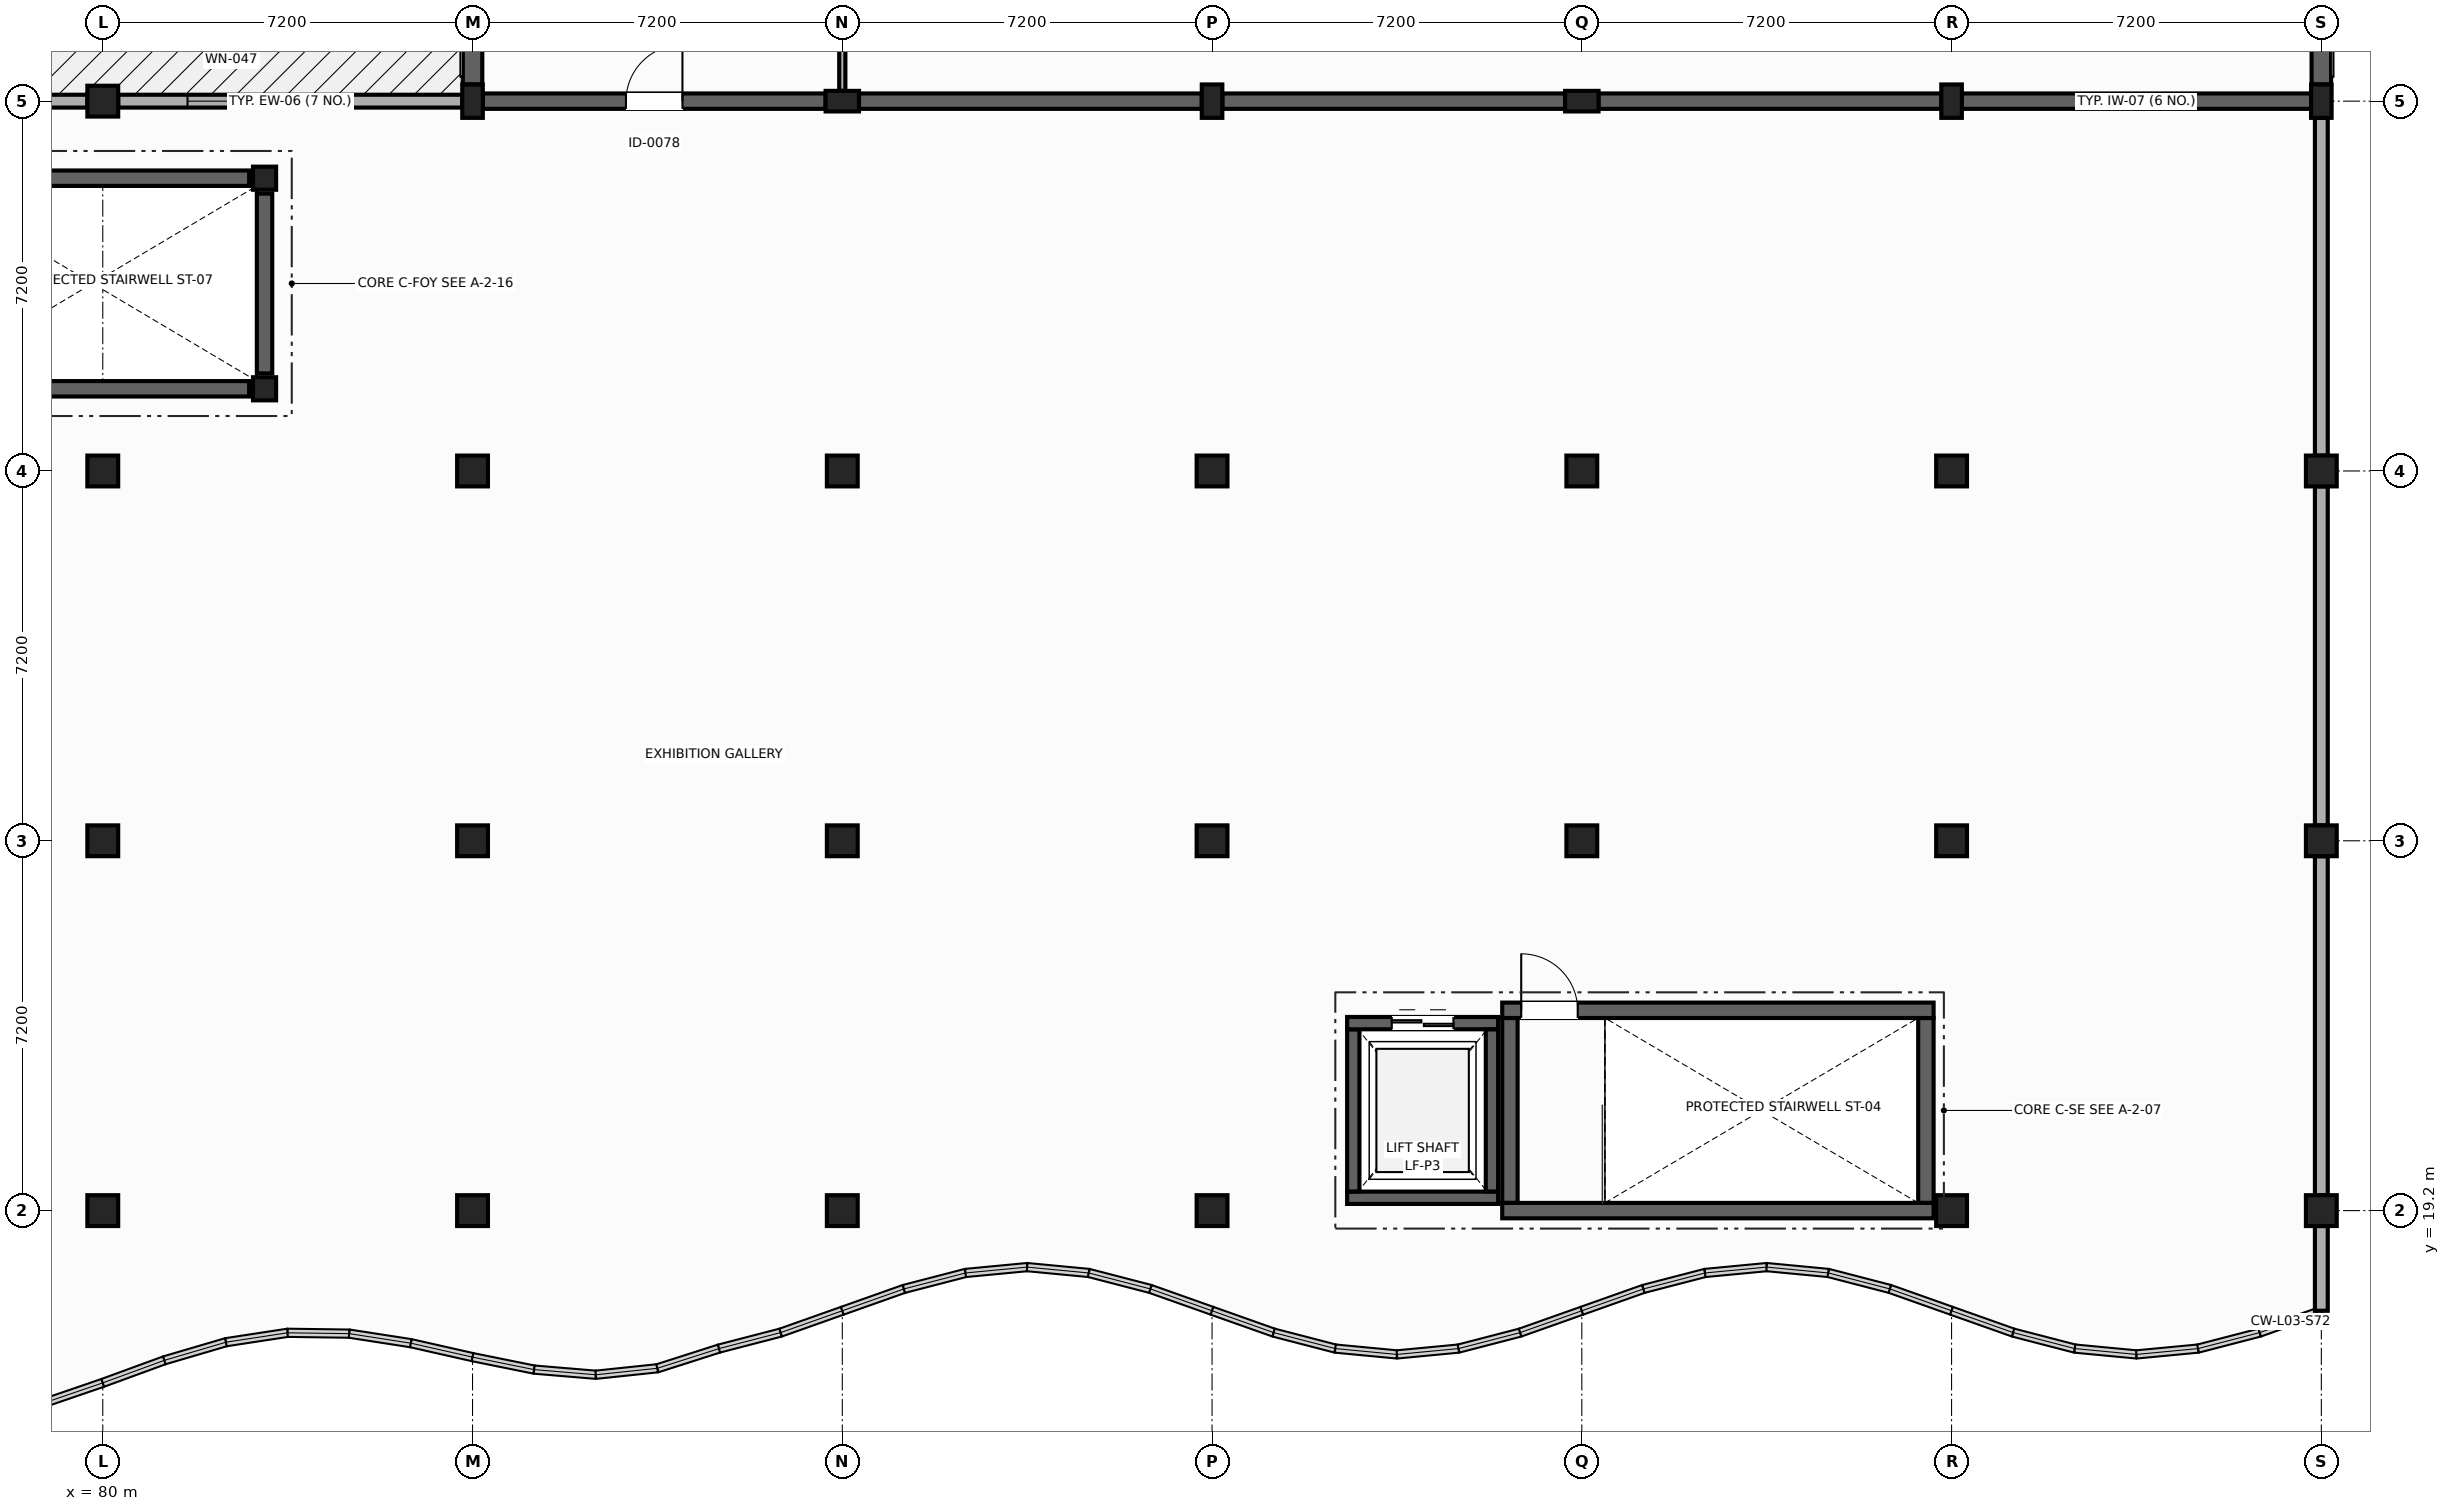
"""IFC4 building model, lengths in metres.
Left out: names, types, materials, properties, quantities, classifications, styles, units other than length and angle.
Written with IfcOpenShell. Run it as: python <this file> out.ifc"""

import sys

from ifc_helpers import new_model, si_unit, direction, frame, frame_2d, origin, origin_2d, place, context, subcontext, project, spatial, rectangle, extrude, element, fill, save


model = new_model("IFC4")
c1 = context("Model", 3, precision=1e-05, world=origin(), true_north=direction((0.0, 1.0)))
c2 = subcontext(c1, "Body", "Model", "MODEL_VIEW")
j1 = project(units=[si_unit("LENGTHUNIT", "METRE"), si_unit("PLANEANGLEUNIT", "RADIAN")], contexts=[c1])
p1 = place(None, origin())
s1 = spatial("IfcSite", under=j1, at=p1, CompositionType="ELEMENT")
p2 = place(p1, origin())
s2 = spatial("IfcBuilding", under=s1, at=p2, CompositionType="ELEMENT")
p3 = place(p2, frame((0.0, 0.0, 14.4)))
s3 = spatial("IfcBuildingStorey", under=s2, at=p3, CompositionType="ELEMENT", Elevation=14.4)
for number, where, z_axis, x_axis in (
    (1, (80.0, 19.2, 0.0), (0.0, 0.0, 1.0), (0.0, 1.0, 0.0)),
    (2, (87.2, 19.2, 0.0), (0.0, 0.0, 1.0), (1.0, 0.0, 0.0)),
    (3, (94.4, 19.2, 0.0), (0.0, 0.0, 1.0), (0.0, 1.0, 0.0)),
    (4, (101.6, 19.2, 0.0), (0.0, 0.0, 1.0), (1.0, 0.0, 0.0)),
    (5, (116.0, 19.2, 0.0), (0.0, 0.0, 1.0), (0.0, 1.0, 0.0)),
    (6, (123.2, 19.2, 0.0), (0.0, 0.0, 1.0), (1.0, 0.0, 0.0)),
    (7, (80.0, 26.4, 0.0), (0.0, 0.0, 1.0), (1.0, 0.0, 0.0)),
    (8, (87.2, 26.4, 0.0), (0.0, 0.0, 1.0), (0.0, 1.0, 0.0)),
    (9, (94.4, 26.4, 0.0), (0.0, 0.0, 1.0), (1.0, 0.0, 0.0)),
    (10, (101.6, 26.4, 0.0), (0.0, 0.0, 1.0), (1.0, 0.0, 0.0)),
    (11, (108.8, 26.4, 0.0), (0.0, 0.0, 1.0), (0.0, 1.0, 0.0)),
    (12, (116.0, 26.4, 0.0), (0.0, 0.0, 1.0), (1.0, 0.0, 0.0)),
    (13, (123.2, 26.4, 0.0), (0.0, 0.0, 1.0), (0.0, 1.0, 0.0)),
    (14, (80.0, 33.6, 0.0), (0.0, 0.0, 1.0), (0.0, 1.0, 0.0)),
    (15, (87.2, 33.6, 0.0), (0.0, 0.0, 1.0), (1.0, 0.0, 0.0)),
    (16, (94.4, 33.6, 0.0), (0.0, 0.0, 1.0), (1.0, 0.0, 0.0)),
    (17, (101.6, 33.6, 0.0), (0.0, 0.0, 1.0), (0.0, 1.0, 0.0)),
    (18, (108.8, 33.6, 0.0), (0.0, 0.0, 1.0), (1.0, 0.0, 0.0)),
    (19, (116.0, 33.6, 0.0), (0.0, 0.0, 1.0), (0.0, 1.0, 0.0)),
    (20, (123.2, 33.6, 0.0), (0.0, 0.0, 1.0), (1.0, 0.0, 0.0)),
    (21, (80.0, 40.8, 0.0), (0.0, 0.0, 1.0), (1.0, 0.0, 0.0)),
):
    element("IfcColumn", number, at=place(p3, frame(where, z_axis=z_axis, x_axis=x_axis)), inside=s3, PredefinedType="COLUMN", context=c2, shape_type="SweptSolid", body=[
        extrude(rectangle(XDim=0.6, YDim=0.6, at=origin_2d()), origin(), (0.0, 0.0, 1.0), 4.28),
    ])
p4 = place(p3, frame((87.2, 40.8, 0.0), z_axis=(0.0, 0.0, 1.0), x_axis=(1.0, 0.0, 0.0)))
e22 = element("IfcColumn", 22, at=p4, inside=s3, PredefinedType="PILASTER", context=c2, shape_type="SweptSolid", body=[
    extrude(rectangle(XDim=0.4, YDim=0.65, at=origin_2d()), origin(), (0.0, 0.0, 1.0), 4.5),
])
for number, where, z_axis, x_axis in (
    (23, (94.4, 40.8, 0.0), (0.0, 0.0, 1.0), (0.0, 1.0, 0.0)),
    (24, (101.6, 40.8, 0.0), (0.0, 0.0, 1.0), (1.0, 0.0, 0.0)),
    (25, (108.8, 40.8, 0.0), (0.0, 0.0, 1.0), (0.0, 1.0, 0.0)),
    (26, (116.0, 40.8, 0.0), (0.0, 0.0, 1.0), (1.0, 0.0, 0.0)),
):
    element("IfcColumn", number, at=place(p3, frame(where, z_axis=z_axis, x_axis=x_axis)), inside=s3, PredefinedType="PILASTER", context=c2, shape_type="SweptSolid", body=[
        extrude(rectangle(XDim=0.4, YDim=0.65, at=origin_2d()), origin(), (0.0, 0.0, 1.0), 4.28),
    ])
p5 = place(p3, frame((123.2, 40.8, 0.0), z_axis=(0.0, 0.0, 1.0), x_axis=(1.0, 0.0, 0.0)))
e27 = element("IfcColumn", 27, at=p5, inside=s3, PredefinedType="PILASTER", context=c2, shape_type="SweptSolid", body=[
    extrude(rectangle(XDim=0.4, YDim=0.65, at=origin_2d()), origin(), (0.0, 0.0, 1.0), 4.5),
])
for number, where, z_axis, x_axis in (
    (28, (83.15, 35.2, 0.0), (0.0, 0.0, 1.0), (1.0, 0.0, 0.0)),
    (29, (83.15, 39.3, 0.0), (0.0, 0.0, 1.0), (1.0, 0.0, 0.0)),
):
    element("IfcColumn", number, at=place(p3, frame(where, z_axis=z_axis, x_axis=x_axis)), inside=s3, PredefinedType="COLUMN", context=c2, shape_type="SweptSolid", body=[
        extrude(rectangle(XDim=0.45, YDim=0.45, at=origin_2d()), origin(), (0.0, 0.0, 1.0), 4.28),
    ])
p6 = place(p3, frame((123.2, 40.475, 0.0), z_axis=(0.0, 0.0, 1.0), x_axis=(0.0, -1.0, 0.0)))
e30 = element("IfcWall", 30, at=p6, inside=s3, PredefinedType="SOLIDWALL", context=c2, shape_type="SweptSolid", body=[
    extrude(rectangle(XDim=6.575, YDim=0.25, at=frame_2d((3.288, 0.0))), origin(), (0.0, 0.0, 1.0), 3.575),
])
for number, where, z_axis, x_axis in (
    (31, (123.2, 33.3, 0.0), (0.0, 0.0, 1.0), (0.0, -1.0, 0.0)),
    (32, (123.2, 26.1, 0.0), (0.0, 0.0, 1.0), (0.0, -1.0, 0.0)),
):
    element("IfcWall", number, at=place(p3, frame(where, z_axis=z_axis, x_axis=x_axis)), inside=s3, PredefinedType="SOLIDWALL", context=c2, shape_type="SweptSolid", body=[
        extrude(rectangle(XDim=6.6, YDim=0.25, at=frame_2d((3.3, 0.0))), origin(), (0.0, 0.0, 1.0), 3.575),
    ])
p7 = place(p3, frame((73.1, 40.8, 0.0), z_axis=(0.0, 0.0, 1.0), x_axis=(1.0, 0.0, 0.0)))
e33 = element("IfcWall", 33, at=p7, inside=s3, PredefinedType="SOLIDWALL", context=c2, shape_type="SweptSolid", body=[
    extrude(rectangle(XDim=6.6, YDim=0.25, at=frame_2d((3.3, 0.0))), origin(), (0.0, 0.0, 1.0), 3.775),
])
p8 = place(p7, frame((2.65, 0.0, 0.9)))
e34 = element("IfcOpeningElement", 34, at=p8, cuts=e33, PredefinedType="OPENING", context=c2, shape_type="SweptSolid", body=[
    extrude(rectangle(XDim=1.3, YDim=1.6, at=frame_2d((0.65, 0.8))), frame((0.0, 0.135, 0.0), z_axis=(0.0, -1.0, 0.0), x_axis=(1.0, 0.0, 0.0)), (0.0, 0.0, 1.0), 0.27),
])
p9 = place(p3, frame((80.3, 40.8, 0.0), z_axis=(0.0, 0.0, 1.0), x_axis=(1.0, 0.0, 0.0)))
e35 = element("IfcWall", 35, at=p9, inside=s3, PredefinedType="SOLIDWALL", context=c2, shape_type="SweptSolid", body=[
    extrude(rectangle(XDim=6.7, YDim=0.25, at=frame_2d((3.35, 0.0))), origin(), (0.0, 0.0, 1.0), 3.775),
])
p10 = place(p9, frame((1.35, 0.0, 0.9)))
e36 = element("IfcOpeningElement", 36, at=p10, cuts=e35, PredefinedType="OPENING", context=c2, shape_type="SweptSolid", body=[
    extrude(rectangle(XDim=1.7, YDim=1.6, at=frame_2d((0.85, 0.8))), frame((0.0, 0.135, 0.0), z_axis=(0.0, -1.0, 0.0), x_axis=(1.0, 0.0, 0.0)), (0.0, 0.0, 1.0), 0.27),
])
for number, where, z_axis, x_axis in (
    (37, (87.2, 41.125, 0.0), (0.0, 0.0, 1.0), (0.0, 1.0, 0.0)),
    (38, (123.2, 47.8, 0.0), (0.0, 0.0, 1.0), (0.0, -1.0, 0.0)),
):
    element("IfcWall", number, at=place(p3, frame(where, z_axis=z_axis, x_axis=x_axis)), inside=s3, PredefinedType="SHEAR", context=c2, shape_type="SweptSolid", body=[
        extrude(rectangle(XDim=6.675, YDim=0.38, at=frame_2d((3.337, 0.0))), origin(), (0.0, 0.0, 1.0), 4.5),
    ])
p11 = place(p3, frame((123.2, 17.25, 0.0), z_axis=(0.0, 0.0, 1.0), x_axis=(0.0, 1.0, 0.0)))
e39 = element("IfcWall", 39, at=p11, inside=s3, PredefinedType="SOLIDWALL", context=c2, shape_type="SweptSolid", body=[
    extrude(rectangle(XDim=1.65, YDim=0.25, at=frame_2d((0.825, 0.0))), origin(), (0.0, 0.0, 1.0), 3.435),
])
p12 = place(p3, frame((115.65, 19.2, 0.0), z_axis=(0.0, 0.0, 1.0), x_axis=(-1.0, 0.0, 0.0)))
e40 = element("IfcWall", 40, at=p12, inside=s3, PredefinedType="SHEAR", context=c2, shape_type="SweptSolid", body=[
    extrude(rectangle(XDim=8.4, YDim=0.3, at=frame_2d((4.2, 0.0))), origin(), (0.0, 0.0, 1.0), 4.28),
])
p13 = place(p3, frame((107.4, 19.352, 0.0), z_axis=(0.0, 0.0, 1.0), x_axis=(0.0, 1.0, 0.0)))
e41 = element("IfcWall", 41, at=p13, inside=s3, PredefinedType="SHEAR", context=c2, shape_type="SweptSolid", body=[
    extrude(rectangle(XDim=3.598, YDim=0.3, at=frame_2d((1.799, 0.0))), origin(), (0.0, 0.0, 1.0), 4.28),
])
p14 = place(p3, frame((107.25, 23.1, 0.0), z_axis=(0.0, 0.0, 1.0), x_axis=(1.0, 0.0, 0.0)))
e42 = element("IfcWall", 42, at=p14, inside=s3, PredefinedType="SHEAR", context=c2, shape_type="SweptSolid", body=[
    extrude(rectangle(XDim=8.4, YDim=0.3, at=frame_2d((4.2, 0.0))), origin(), (0.0, 0.0, 1.0), 4.28),
])
p15 = place(p14, frame((0.37, 0.0, 0.0)))
e43 = element("IfcOpeningElement", 43, at=p15, cuts=e42, PredefinedType="OPENING", context=c2, shape_type="SweptSolid", body=[
    extrude(rectangle(XDim=1.1, YDim=2.15, at=frame_2d((0.55, 1.075))), frame((0.0, 0.16, 0.0), z_axis=(0.0, -1.0, 0.0), x_axis=(1.0, 0.0, 0.0)), (0.0, 0.0, 1.0), 0.32),
])
p16 = place(p3, frame((115.5, 22.948, 0.0), z_axis=(0.0, 0.0, 1.0), x_axis=(0.0, -1.0, 0.0)))
e44 = element("IfcWall", 44, at=p16, inside=s3, PredefinedType="SHEAR", context=c2, shape_type="SweptSolid", body=[
    extrude(rectangle(XDim=3.596, YDim=0.3, at=frame_2d((1.798, 0.0))), origin(), (0.0, 0.0, 1.0), 4.28),
])
p17 = place(p3, frame((107.17, 19.45, 0.0), z_axis=(0.0, 0.0, 1.0), x_axis=(-1.0, 0.0, 0.0)))
e45 = element("IfcWall", 45, at=p17, inside=s3, PredefinedType="SHEAR", context=c2, shape_type="SweptSolid", body=[
    extrude(rectangle(XDim=2.94, YDim=0.24, at=frame_2d((1.47, 0.0))), origin(), (0.0, 0.0, 1.0), 4.28),
])
p18 = place(p3, frame((104.35, 19.572, 0.0), z_axis=(0.0, 0.0, 1.0), x_axis=(0.0, 1.0, 0.0)))
e46 = element("IfcWall", 46, at=p18, inside=s3, PredefinedType="SHEAR", context=c2, shape_type="SweptSolid", body=[
    extrude(rectangle(XDim=3.158, YDim=0.24, at=frame_2d((1.579, 0.0))), origin(), (0.0, 0.0, 1.0), 4.28),
])
p19 = place(p3, frame((104.23, 22.85, 0.0), z_axis=(0.0, 0.0, 1.0), x_axis=(1.0, 0.0, 0.0)))
e47 = element("IfcWall", 47, at=p19, inside=s3, PredefinedType="SHEAR", context=c2, shape_type="SweptSolid", body=[
    extrude(rectangle(XDim=2.94, YDim=0.24, at=frame_2d((1.47, 0.0))), origin(), (0.0, 0.0, 1.0), 4.28),
])
p20 = place(p19, frame((0.87, 0.0, 0.0)))
e48 = element("IfcOpeningElement", 48, at=p20, cuts=e47, PredefinedType="OPENING", context=c2, shape_type="SweptSolid", body=[
    extrude(rectangle(XDim=1.2, YDim=2.15, at=frame_2d((0.6, 1.075))), frame((0.0, 0.13, 0.0), z_axis=(0.0, -1.0, 0.0), x_axis=(1.0, 0.0, 0.0)), (0.0, 0.0, 1.0), 0.26),
])
p21 = place(p3, frame((107.05, 22.728, 0.0), z_axis=(0.0, 0.0, 1.0), x_axis=(0.0, -1.0, 0.0)))
e49 = element("IfcWall", 49, at=p21, inside=s3, PredefinedType="SHEAR", context=c2, shape_type="SweptSolid", body=[
    extrude(rectangle(XDim=3.156, YDim=0.24, at=frame_2d((1.578, 0.0))), origin(), (0.0, 0.0, 1.0), 4.28),
])
p22 = place(p3, frame((82.85, 35.2, 0.0), z_axis=(0.0, 0.0, 1.0), x_axis=(-1.0, 0.0, 0.0)))
e50 = element("IfcWall", 50, at=p22, inside=s3, PredefinedType="SHEAR", context=c2, shape_type="SweptSolid", body=[
    extrude(rectangle(XDim=7.9, YDim=0.3, at=frame_2d((3.95, 0.0))), origin(), (0.0, 0.0, 1.0), 4.28),
])
p23 = place(p22, frame((6.48, 0.0, 0.0)))
e51 = element("IfcOpeningElement", 51, at=p23, cuts=e50, PredefinedType="OPENING", context=c2, shape_type="SweptSolid", body=[
    extrude(rectangle(XDim=1.1, YDim=2.15, at=frame_2d((0.55, 1.075))), frame((0.0, 0.16, 0.0), z_axis=(0.0, -1.0, 0.0), x_axis=(1.0, 0.0, 0.0)), (0.0, 0.0, 1.0), 0.32),
])
p24 = place(p3, frame((74.95, 39.3, 0.0), z_axis=(0.0, 0.0, 1.0), x_axis=(1.0, 0.0, 0.0)))
e52 = element("IfcWall", 52, at=p24, inside=s3, PredefinedType="SHEAR", context=c2, shape_type="SweptSolid", body=[
    extrude(rectangle(XDim=7.9, YDim=0.3, at=frame_2d((3.95, 0.0))), origin(), (0.0, 0.0, 1.0), 4.28),
])
p25 = place(p3, frame((83.15, 39.0, 0.0), z_axis=(0.0, 0.0, 1.0), x_axis=(0.0, -1.0, 0.0)))
e53 = element("IfcWall", 53, at=p25, inside=s3, PredefinedType="SHEAR", context=c2, shape_type="SweptSolid", body=[
    extrude(rectangle(XDim=3.5, YDim=0.3, at=frame_2d((1.75, 0.0))), origin(), (0.0, 0.0, 1.0), 4.28),
])
p26 = place(p3, frame((87.4, 40.8, 0.0), z_axis=(0.0, 0.0, 1.0), x_axis=(1.0, 0.0, 0.0)))
e54 = element("IfcWall", 54, at=p26, inside=s3, PredefinedType="SHEAR", context=c2, shape_type="SweptSolid", body=[
    extrude(rectangle(XDim=6.675, YDim=0.3, at=frame_2d((3.337, 0.0))), origin(), (0.0, 0.0, 1.0), 4.28),
])
p27 = place(p26, frame((2.788, 0.0, 0.0)))
e55 = element("IfcOpeningElement", 55, at=p27, cuts=e54, PredefinedType="OPENING", context=c2, shape_type="SweptSolid", body=[
    extrude(rectangle(XDim=1.1, YDim=2.15, at=frame_2d((0.55, 1.075))), frame((0.0, 0.16, 0.0), z_axis=(0.0, -1.0, 0.0), x_axis=(1.0, 0.0, 0.0)), (0.0, 0.0, 1.0), 0.32),
])
p28 = place(p3, frame((94.725, 40.8, 0.0), z_axis=(0.0, 0.0, 1.0), x_axis=(1.0, 0.0, 0.0)))
e56 = element("IfcWall", 56, at=p28, inside=s3, PredefinedType="SHEAR", context=c2, shape_type="SweptSolid", body=[
    extrude(rectangle(XDim=6.675, YDim=0.3, at=frame_2d((3.337, 0.0))), origin(), (0.0, 0.0, 1.0), 4.28),
])
for number, where, z_axis, x_axis in (
    (57, (101.8, 40.8, 0.0), (0.0, 0.0, 1.0), (1.0, 0.0, 0.0)),
    (58, (109.125, 40.8, 0.0), (0.0, 0.0, 1.0), (1.0, 0.0, 0.0)),
):
    element("IfcWall", number, at=place(p3, frame(where, z_axis=z_axis, x_axis=x_axis)), inside=s3, PredefinedType="SHEAR", context=c2, shape_type="SweptSolid", body=[
        extrude(rectangle(XDim=6.675, YDim=0.3, at=frame_2d((3.337, 0.0))), origin(), (0.0, 0.0, 1.0), 4.28),
    ])
p29 = place(p3, frame((116.2, 40.8, 0.0), z_axis=(0.0, 0.0, 1.0), x_axis=(1.0, 0.0, 0.0)))
e59 = element("IfcWall", 59, at=p29, inside=s3, PredefinedType="SHEAR", context=c2, shape_type="SweptSolid", body=[
    extrude(rectangle(XDim=6.8, YDim=0.3, at=frame_2d((3.4, 0.0))), origin(), (0.0, 0.0, 1.0), 4.28),
])
p30 = place(p3, frame((94.4, 47.938, 0.0), z_axis=(0.0, 0.0, 1.0), x_axis=(0.0, -1.0, 0.0)))
e60 = element("IfcWall", 60, at=p30, inside=s3, PredefinedType="PARTITIONING", context=c2, shape_type="SweptSolid", body=[
    extrude(rectangle(XDim=6.938, YDim=0.12, at=frame_2d((3.469, 0.0))), origin(), (0.0, 0.0, 1.0), 4.299),
])
p31 = place(p30, frame((2.919, 0.0, 0.0)))
e61 = element("IfcOpeningElement", 61, at=p31, cuts=e60, PredefinedType="OPENING", context=c2, shape_type="SweptSolid", body=[
    extrude(rectangle(XDim=1.1, YDim=2.15, at=frame_2d((0.55, 1.075))), frame((0.0, 0.07, 0.0), z_axis=(0.0, -1.0, 0.0), x_axis=(1.0, 0.0, 0.0)), (0.0, 0.0, 1.0), 0.14),
])
p32 = place(p10, origin())
e62 = element("IfcWindow", 62, at=p32, inside=s3, PartitioningType="SINGLE_PANEL", PredefinedType="WINDOW", context=c2, shape_type="SweptSolid", body=[
    extrude(rectangle(XDim=1.7, YDim=1.6, at=frame_2d((0.85, 0.8))), frame((0.0, 0.03, 0.0), z_axis=(0.0, -1.0, 0.0), x_axis=(1.0, 0.0, 0.0)), (0.0, 0.0, 1.0), 0.06),
])
fill(e36, e62)
p33 = place(p15, origin())
e63 = element("IfcDoor", 63, at=p33, inside=s3, OperationType="SINGLE_SWING_LEFT", PredefinedType="DOOR", context=c2, shape_type="SweptSolid", body=[
    extrude(rectangle(XDim=1.1, YDim=2.15, at=frame_2d((0.55, 1.075))), frame((0.0, 0.025, 0.0), z_axis=(0.0, -1.0, 0.0), x_axis=(1.0, 0.0, 0.0)), (0.0, 0.0, 1.0), 0.05),
])
fill(e43, e63)
p34 = place(p20, origin())
e64 = element("IfcDoor", 64, at=p34, inside=s3, OperationType="DOUBLE_DOOR_SLIDING", PredefinedType="DOOR", context=c2, shape_type="SweptSolid", body=[
    extrude(rectangle(XDim=1.2, YDim=2.15, at=frame_2d((0.6, 1.075))), frame((0.0, 0.025, 0.0), z_axis=(0.0, -1.0, 0.0), x_axis=(1.0, 0.0, 0.0)), (0.0, 0.0, 1.0), 0.05),
])
fill(e48, e64)
p35 = place(p27, origin())
e65 = element("IfcDoor", 65, at=p35, inside=s3, OperationType="SINGLE_SWING_RIGHT", PredefinedType="DOOR", context=c2, shape_type="SweptSolid", body=[
    extrude(rectangle(XDim=1.1, YDim=2.15, at=frame_2d((0.55, 1.075))), frame((0.0, 0.025, 0.0), z_axis=(0.0, -1.0, 0.0), x_axis=(1.0, 0.0, 0.0)), (0.0, 0.0, 1.0), 0.05),
])
fill(e55, e65)
save(model, sys.argv[1])
